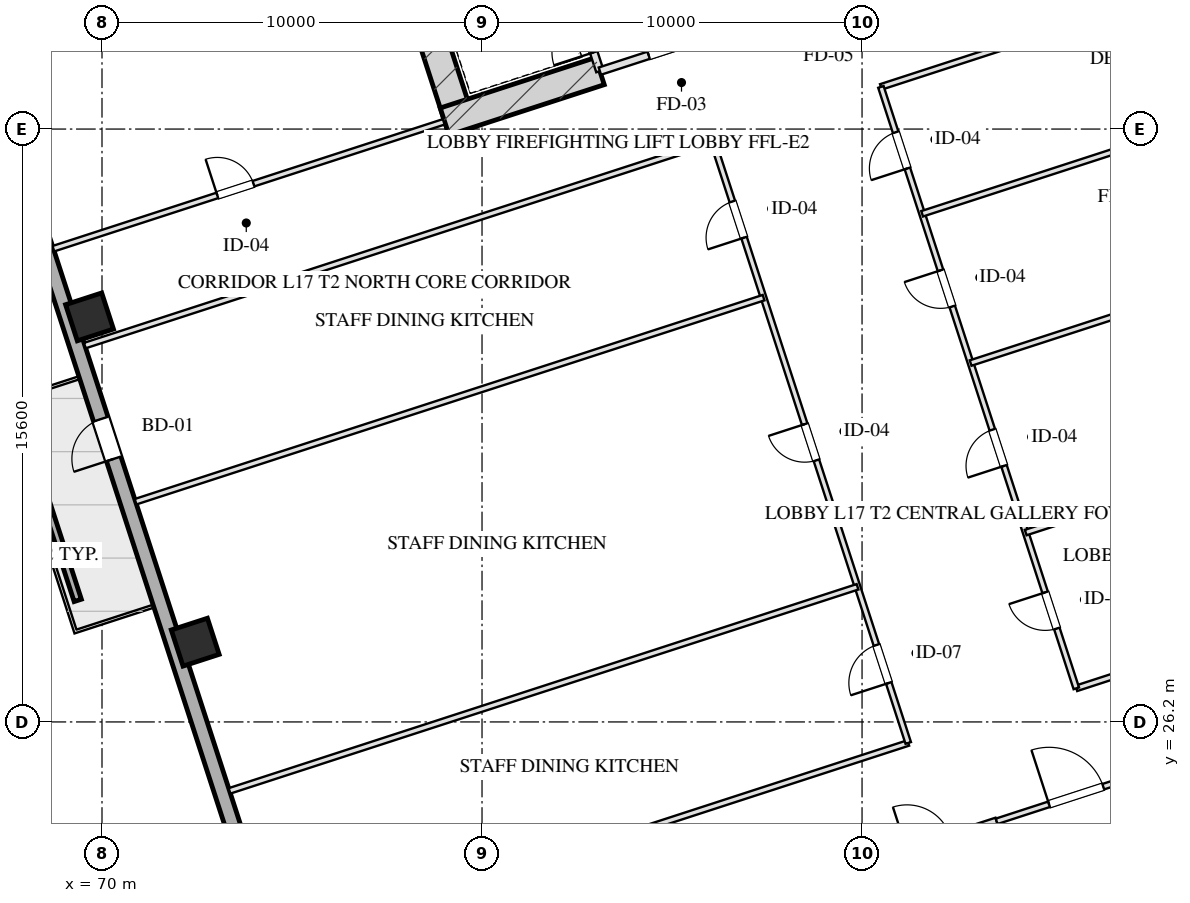
"""IFC4 building model, lengths in metres.
Left out: names, types, materials, properties, quantities, classifications, styles, units other than length and angle.
Written with IfcOpenShell. Run it as: python <this file> out.ifc"""

import sys

from ifc_helpers import new_model, si_unit, direction, frame, frame_2d, origin, origin_2d, place, context, subcontext, project, spatial, rectangle, hollow_rectangle, extrude, element, fill, save


model = new_model("IFC4")
c1 = context("Model", 3, precision=1e-05, world=origin(), true_north=direction((0.0, 1.0)))
c2 = subcontext(c1, "Body", "Model", "MODEL_VIEW")
j1 = project(units=[si_unit("LENGTHUNIT", "METRE"), si_unit("PLANEANGLEUNIT", "RADIAN")], contexts=[c1])
p1 = place(None, origin())
s1 = spatial("IfcSite", under=j1, at=p1, CompositionType="ELEMENT")
p2 = place(p1, origin())
s2 = spatial("IfcBuilding", under=s1, at=p2, CompositionType="ELEMENT")
p3 = place(p2, frame((0.0, 0.0, 71.3)))
s3 = spatial("IfcBuildingStorey", under=s2, at=p3, CompositionType="ELEMENT", Elevation=71.3)
p4 = place(p3, frame((79.489, 41.756, 0.0), z_axis=(0.0, 0.0, 1.0), x_axis=(-0.309016134813, 0.951056795583, 0.0)))
e1 = element("IfcWall", 1, at=p4, inside=s3, PredefinedType="SHEAR", context=c2, shape_type="SweptSolid", body=[
    extrude(rectangle(XDim=9.63, YDim=0.75, at=frame_2d((4.815, 0.0))), origin(), (0.0, 0.0, 1.0), 3.45),
])
p5 = place(p3, frame((79.016, 41.997, 0.0), z_axis=(0.0, 0.0, 1.0), x_axis=(0.95106038264, 0.309005094736, 0.0)))
e2 = element("IfcWall", 2, at=p5, inside=s3, PredefinedType="SHEAR", context=c2, shape_type="SweptSolid", body=[
    extrude(rectangle(XDim=4.295, YDim=0.75, at=frame_2d((2.147, 0.0))), origin(), (0.0, 0.0, 1.0), 3.45),
])
for number, where, z_axis, x_axis in (
    (3, (72.453, 28.299, 0.0), (0.0, 0.0, 1.0), (0.951, 0.309, 0.0)),
    (4, (69.672, 36.858, 0.0), (0.0, 0.0, 1.0), (0.951, 0.309, 0.0)),
):
    element("IfcColumn", number, at=place(p3, frame(where, z_axis=z_axis, x_axis=x_axis)), inside=s3, PredefinedType="COLUMN", context=c2, shape_type="SweptSolid", body=[
        extrude(hollow_rectangle(XDim=1.0, YDim=1.0, WallThickness=0.036, at=origin_2d()), origin(), (0.0, 0.0, 1.0), 3.451),
    ])
p6 = place(p3, frame((79.655, 4.352, 0.0), z_axis=(0.0, 0.0, 1.0), x_axis=(-0.309014526607, 0.951057318118, 0.0)))
e5 = element("IfcWall", 5, at=p6, inside=s3, PredefinedType="SOLIDWALL", context=c2, shape_type="SweptSolid", body=[
    extrude(rectangle(XDim=50.0, YDim=0.4, at=frame_2d((25.0, 0.0))), origin(), (0.0, 0.0, 1.0), 2.61),
])
p7 = place(p6, frame((17.35, 0.0, 0.75)))
e6 = element("IfcOpeningElement", 6, at=p7, cuts=e5, PredefinedType="OPENING", context=c2, shape_type="SweptSolid", body=[
    extrude(rectangle(XDim=2.5, YDim=1.46, at=frame_2d((1.25, 0.73))), frame((0.0, 0.21, 0.0), z_axis=(0.0, -1.0, 0.0), x_axis=(1.0, 0.0, 0.0)), (0.0, 0.0, 1.0), 0.42),
])
p8 = place(p6, frame((30.25, 0.0, 0.0)))
e7 = element("IfcOpeningElement", 7, at=p8, cuts=e5, PredefinedType="OPENING", context=c2, shape_type="SweptSolid", body=[
    extrude(rectangle(XDim=1.1, YDim=2.15, at=frame_2d((0.55, 1.075))), frame((0.0, 0.21, 0.0), z_axis=(0.0, -1.0, 0.0), x_axis=(1.0, 0.0, 0.0)), (0.0, 0.0, 1.0), 0.42),
])
p9 = place(p3, frame((69.362, 29.397, 0.0), z_axis=(0.0, 0.0, 1.0), x_axis=(-0.309032019345, 0.951051634255, 0.0)))
e8 = element("IfcWall", 8, at=p9, inside=s3, PredefinedType="PARAPET", context=c2, shape_type="SweptSolid", body=[
    extrude(rectangle(XDim=4.8, YDim=0.2, at=frame_2d((2.4, 0.0))), origin(), (0.0, 0.0, 1.0), 0.75),
])
p10 = place(p3, frame((93.542, 23.585, 0.0), z_axis=(0.0, 0.0, 1.0), x_axis=(0.309042196757, -0.951048327176, 0.0)))
e9 = element("IfcWall", 9, at=p10, inside=s3, PredefinedType="PARTITIONING", context=c2, shape_type="SweptSolid", body=[
    extrude(rectangle(XDim=8.43, YDim=0.2, at=frame_2d((4.215, 0.0))), origin(), (0.0, 0.0, 1.0), 3.175),
])
p11 = place(p3, frame((89.899, 22.401, 0.0), z_axis=(0.0, 0.0, 1.0), x_axis=(0.951046716504, 0.309047153403, 0.0)))
e10 = element("IfcWall", 10, at=p11, inside=s3, PredefinedType="PARTITIONING", context=c2, shape_type="SweptSolid", body=[
    extrude(rectangle(XDim=3.83, YDim=0.2, at=frame_2d((1.915, 0.0))), origin(), (0.0, 0.0, 1.0), 3.175),
])
p12 = place(p11, frame((1.35, 0.0, 0.0)))
e11 = element("IfcOpeningElement", 11, at=p12, cuts=e10, PredefinedType="OPENING", context=c2, shape_type="SweptSolid", body=[
    extrude(rectangle(XDim=1.2, YDim=2.05, at=frame_2d((0.6, 1.025))), frame((0.0, 0.11, 0.0), z_axis=(0.0, -1.0, 0.0), x_axis=(1.0, 0.0, 0.0)), (0.0, 0.0, 1.0), 0.22),
])
p13 = place(p3, frame((93.542, 23.585, 0.0), z_axis=(0.0, 0.0, 1.0), x_axis=(0.951063829732, 0.308994485023, 0.0)))
e12 = element("IfcWall", 12, at=p13, inside=s3, PredefinedType="PARTITIONING", context=c2, shape_type="SweptSolid", body=[
    extrude(rectangle(XDim=4.4, YDim=0.15, at=frame_2d((2.2, 0.0))), origin(), (0.0, 0.0, 1.0), 3.175),
])
p14 = place(p13, frame((1.45, 0.0, 0.0)))
e13 = element("IfcOpeningElement", 13, at=p14, cuts=e12, PredefinedType="OPENING", context=c2, shape_type="SweptSolid", body=[
    extrude(rectangle(XDim=1.5, YDim=2.05, at=frame_2d((0.75, 1.025))), frame((0.0, 0.085, 0.0), z_axis=(0.0, -1.0, 0.0), x_axis=(1.0, 0.0, 0.0)), (0.0, 0.0, 1.0), 0.17),
])
p15 = place(p3, frame((83.101, 43.324, 0.0), z_axis=(0.0, 0.0, 1.0), x_axis=(-0.309048298632, 0.951046344356, 0.0)))
e14 = element("IfcWall", 14, at=p15, inside=s3, PredefinedType="PARTITIONING", context=c2, shape_type="SweptSolid", body=[
    extrude(rectangle(XDim=1.9, YDim=0.2, at=frame_2d((0.95, 0.0))), origin(), (0.0, 0.0, 1.0), 3.175),
])
p16 = place(p15, frame((0.52, 0.0, 0.0)))
e15 = element("IfcOpeningElement", 15, at=p16, cuts=e14, PredefinedType="OPENING", context=c2, shape_type="SweptSolid", body=[
    extrude(rectangle(XDim=1.1, YDim=2.05, at=frame_2d((0.55, 1.025))), frame((0.0, 0.11, 0.0), z_axis=(0.0, -1.0, 0.0), x_axis=(1.0, 0.0, 0.0)), (0.0, 0.0, 1.0), 0.22),
])
p17 = place(p3, frame((83.101, 43.324, 0.0), z_axis=(0.0, 0.0, 1.0), x_axis=(0.951052804469, 0.309028417967, 0.0)))
e16 = element("IfcWall", 16, at=p17, inside=s3, PredefinedType="PARTITIONING", context=c2, shape_type="SweptSolid", body=[
    extrude(rectangle(XDim=3.83, YDim=0.2, at=frame_2d((1.915, 0.0))), origin(), (0.0, 0.0, 1.0), 3.175),
])
p18 = place(p17, frame((1.35, 0.0, 0.0)))
e17 = element("IfcOpeningElement", 17, at=p18, cuts=e16, PredefinedType="OPENING", context=c2, shape_type="SweptSolid", body=[
    extrude(rectangle(XDim=1.2, YDim=2.05, at=frame_2d((0.6, 1.025))), frame((0.0, 0.11, 0.0), z_axis=(0.0, -1.0, 0.0), x_axis=(1.0, 0.0, 0.0)), (0.0, 0.0, 1.0), 0.22),
])
p19 = place(p3, frame((68.721, 38.652, 0.0), z_axis=(0.0, 0.0, 1.0), x_axis=(0.951056658866, 0.309016555588, 0.0)))
e18 = element("IfcWall", 18, at=p19, inside=s3, PredefinedType="PARTITIONING", context=c2, shape_type="SweptSolid", body=[
    extrude(rectangle(XDim=10.8, YDim=0.15, at=frame_2d((5.4, 0.0))), origin(), (0.0, 0.0, 1.0), 3.175),
])
p20 = place(p19, frame((4.536, 0.0, 0.0)))
e19 = element("IfcOpeningElement", 19, at=p20, cuts=e18, PredefinedType="OPENING", context=c2, shape_type="SweptSolid", body=[
    extrude(rectangle(XDim=1.0, YDim=2.05, at=frame_2d((0.5, 1.025))), frame((0.0, 0.085, 0.0), z_axis=(0.0, -1.0, 0.0), x_axis=(1.0, 0.0, 0.0)), (0.0, 0.0, 1.0), 0.17),
])
p21 = place(p3, frame((74.691, 20.278, 0.0), z_axis=(0.0, 0.0, 1.0), x_axis=(0.951053169828, 0.309027293551, 0.0)))
e20 = element("IfcWall", 20, at=p21, inside=s3, PredefinedType="PARTITIONING", context=c2, shape_type="SweptSolid", body=[
    extrude(rectangle(XDim=17.375, YDim=0.15, at=frame_2d((8.688, 0.0))), origin(), (0.0, 0.0, 1.0), 3.175),
])
p22 = place(p3, frame((95.638, 27.084, 0.0), z_axis=(0.0, 0.0, 1.0), x_axis=(0.951055837847, 0.309019082414, 0.0)))
e21 = element("IfcWall", 21, at=p22, inside=s3, PredefinedType="PARTITIONING", context=c2, shape_type="SweptSolid", body=[
    extrude(rectangle(XDim=15.575, YDim=0.15, at=frame_2d((7.788, 0.0))), origin(), (0.0, 0.0, 1.0), 3.175),
])
p23 = place(p3, frame((69.549, 36.103, 0.0), z_axis=(0.0, 0.0, 1.0), x_axis=(0.951057299418, 0.309014584159, 0.0)))
e22 = element("IfcWall", 22, at=p23, inside=s3, PredefinedType="PARTITIONING", context=c2, shape_type="SweptSolid", body=[
    extrude(rectangle(XDim=17.375, YDim=0.15, at=frame_2d((8.688, 0.0))), origin(), (0.0, 0.0, 1.0), 3.175),
])
p24 = place(p3, frame((90.496, 42.909, 0.0), z_axis=(0.0, 0.0, 1.0), x_axis=(0.951055837847, 0.309019082414, 0.0)))
e23 = element("IfcWall", 23, at=p24, inside=s3, PredefinedType="PARTITIONING", context=c2, shape_type="SweptSolid", body=[
    extrude(rectangle(XDim=15.575, YDim=0.15, at=frame_2d((7.788, 0.0))), origin(), (0.0, 0.0, 1.0), 3.175),
])
p25 = place(p3, frame((91.216, 25.647, 0.0), z_axis=(0.0, 0.0, 1.0), x_axis=(-0.309022042254, 0.951054876125, 0.0)))
e24 = element("IfcWall", 24, at=p25, inside=s3, PredefinedType="PARTITIONING", context=c2, shape_type="SweptSolid", body=[
    extrude(rectangle(XDim=16.64, YDim=0.15, at=frame_2d((8.32, 0.0))), origin(), (0.0, 0.0, 1.0), 3.175),
])
p26 = place(p25, frame((1.66, 0.0, 0.0)))
e25 = element("IfcOpeningElement", 25, at=p26, cuts=e24, PredefinedType="OPENING", context=c2, shape_type="SweptSolid", body=[
    extrude(rectangle(XDim=1.05, YDim=2.05, at=frame_2d((0.525, 1.025))), frame((0.0, 0.085, 0.0), z_axis=(0.0, -1.0, 0.0), x_axis=(1.0, 0.0, 0.0)), (0.0, 0.0, 1.0), 0.17),
])
p27 = place(p25, frame((7.82, 0.0, 0.0)))
e26 = element("IfcOpeningElement", 26, at=p27, cuts=e24, PredefinedType="OPENING", context=c2, shape_type="SweptSolid", body=[
    extrude(rectangle(XDim=1.0, YDim=2.05, at=frame_2d((0.5, 1.025))), frame((0.0, 0.085, 0.0), z_axis=(0.0, -1.0, 0.0), x_axis=(1.0, 0.0, 0.0)), (0.0, 0.0, 1.0), 0.17),
])
p28 = place(p25, frame((13.98, 0.0, 0.0)))
e27 = element("IfcOpeningElement", 27, at=p28, cuts=e24, PredefinedType="OPENING", context=c2, shape_type="SweptSolid", body=[
    extrude(rectangle(XDim=1.0, YDim=2.05, at=frame_2d((0.5, 1.025))), frame((0.0, 0.085, 0.0), z_axis=(0.0, -1.0, 0.0), x_axis=(1.0, 0.0, 0.0)), (0.0, 0.0, 1.0), 0.17),
])
p29 = place(p3, frame((95.638, 27.084, 0.0), z_axis=(0.0, 0.0, 1.0), x_axis=(-0.30901773025, 0.951056277195, 0.0)))
e28 = element("IfcWall", 28, at=p29, inside=s3, PredefinedType="PARTITIONING", context=c2, shape_type="SweptSolid", body=[
    extrude(rectangle(XDim=16.64, YDim=0.15, at=frame_2d((8.32, 0.0))), origin(), (0.0, 0.0, 1.0), 3.175),
])
p30 = place(p29, frame((1.655, 0.0, 0.0)))
e29 = element("IfcOpeningElement", 29, at=p30, cuts=e28, PredefinedType="OPENING", context=c2, shape_type="SweptSolid", body=[
    extrude(rectangle(XDim=1.0, YDim=2.05, at=frame_2d((0.5, 1.025))), frame((0.0, 0.085, 0.0), z_axis=(0.0, -1.0, 0.0), x_axis=(1.0, 0.0, 0.0)), (0.0, 0.0, 1.0), 0.17),
])
p31 = place(p29, frame((6.155, 0.0, 0.0)))
e30 = element("IfcOpeningElement", 30, at=p31, cuts=e28, PredefinedType="OPENING", context=c2, shape_type="SweptSolid", body=[
    extrude(rectangle(XDim=1.0, YDim=2.05, at=frame_2d((0.5, 1.025))), frame((0.0, 0.085, 0.0), z_axis=(0.0, -1.0, 0.0), x_axis=(1.0, 0.0, 0.0)), (0.0, 0.0, 1.0), 0.17),
])
p32 = place(p29, frame((10.565, 0.0, 0.0)))
e31 = element("IfcOpeningElement", 31, at=p32, cuts=e28, PredefinedType="OPENING", context=c2, shape_type="SweptSolid", body=[
    extrude(rectangle(XDim=1.0, YDim=2.05, at=frame_2d((0.5, 1.025))), frame((0.0, 0.085, 0.0), z_axis=(0.0, -1.0, 0.0), x_axis=(1.0, 0.0, 0.0)), (0.0, 0.0, 1.0), 0.17),
])
p33 = place(p29, frame((14.385, 0.0, 0.0)))
e32 = element("IfcOpeningElement", 32, at=p33, cuts=e28, PredefinedType="OPENING", context=c2, shape_type="SweptSolid", body=[
    extrude(rectangle(XDim=1.0, YDim=2.05, at=frame_2d((0.5, 1.025))), frame((0.0, 0.085, 0.0), z_axis=(0.0, -1.0, 0.0), x_axis=(1.0, 0.0, 0.0)), (0.0, 0.0, 1.0), 0.17),
])
for number, where, z_axis, x_axis in (
    (33, (73.356, 24.386, 0.0), (0.0, 0.0, 1.0), (0.951, 0.309, 0.0)),
    (34, (70.884, 31.995, 0.0), (0.0, 0.0, 1.0), (0.951, 0.309, 0.0)),
):
    element("IfcWall", number, at=place(p3, frame(where, z_axis=z_axis, x_axis=x_axis)), inside=s3, PredefinedType="PARTITIONING", context=c2, shape_type="SweptSolid", body=[
        extrude(rectangle(XDim=17.375, YDim=0.15, at=frame_2d((8.688, 0.0))), origin(), (0.0, 0.0, 1.0), 3.175),
    ])
for number, where, z_axis, x_axis in (
    (35, (94.306, 31.183, 0.0), (0.0, 0.0, 1.0), (0.951, 0.309, 0.0)),
    (36, (92.857, 35.643, 0.0), (0.0, 0.0, 1.0), (0.951, 0.309, 0.0)),
    (37, (91.581, 39.57, 0.0), (0.0, 0.0, 1.0), (0.951, 0.309, 0.0)),
):
    element("IfcWall", number, at=place(p3, frame(where, z_axis=z_axis, x_axis=x_axis)), inside=s3, PredefinedType="PARTITIONING", context=c2, shape_type="SweptSolid", body=[
        extrude(rectangle(XDim=15.575, YDim=0.15, at=frame_2d((7.788, 0.0))), origin(), (0.0, 0.0, 1.0), 3.175),
    ])
p34 = place(p8, origin())
e38 = element("IfcDoor", 38, at=p34, inside=s3, OperationType="SINGLE_SWING_LEFT", PredefinedType="DOOR", context=c2, shape_type="SweptSolid", body=[
    extrude(rectangle(XDim=1.1, YDim=2.15, at=frame_2d((0.55, 1.075))), frame((0.0, 0.025, 0.0), z_axis=(0.0, -1.0, 0.0), x_axis=(1.0, 0.0, 0.0)), (0.0, 0.0, 1.0), 0.05),
])
fill(e7, e38)
p35 = place(p14, origin())
e39 = element("IfcDoor", 39, at=p35, inside=s3, OperationType="SINGLE_SWING_LEFT", PredefinedType="DOOR", context=c2, shape_type="SweptSolid", body=[
    extrude(rectangle(XDim=1.5, YDim=2.05, at=frame_2d((0.75, 1.025))), frame((0.0, 0.025, 0.0), z_axis=(0.0, -1.0, 0.0), x_axis=(1.0, 0.0, 0.0)), (0.0, 0.0, 1.0), 0.05),
])
fill(e13, e39)
p36 = place(p18, origin())
e40 = element("IfcDoor", 40, at=p36, inside=s3, OperationType="SINGLE_SWING_LEFT", PredefinedType="DOOR", context=c2, shape_type="SweptSolid", body=[
    extrude(rectangle(XDim=1.2, YDim=2.05, at=frame_2d((0.6, 1.025))), frame((0.0, 0.025, 0.0), z_axis=(0.0, -1.0, 0.0), x_axis=(1.0, 0.0, 0.0)), (0.0, 0.0, 1.0), 0.05),
])
fill(e17, e40)
p37 = place(p20, origin())
e41 = element("IfcDoor", 41, at=p37, inside=s3, OperationType="SINGLE_SWING_LEFT", PredefinedType="DOOR", context=c2, shape_type="SweptSolid", body=[
    extrude(rectangle(XDim=1.0, YDim=2.05, at=frame_2d((0.5, 1.025))), frame((0.0, 0.025, 0.0), z_axis=(0.0, -1.0, 0.0), x_axis=(1.0, 0.0, 0.0)), (0.0, 0.0, 1.0), 0.05),
])
fill(e19, e41)
p38 = place(p26, origin())
e42 = element("IfcDoor", 42, at=p38, inside=s3, OperationType="SINGLE_SWING_LEFT", PredefinedType="DOOR", context=c2, shape_type="SweptSolid", body=[
    extrude(rectangle(XDim=1.05, YDim=2.05, at=frame_2d((0.525, 1.025))), frame((0.0, 0.025, 0.0), z_axis=(0.0, -1.0, 0.0), x_axis=(1.0, 0.0, 0.0)), (0.0, 0.0, 1.0), 0.05),
])
fill(e25, e42)
p39 = place(p27, origin())
e43 = element("IfcDoor", 43, at=p39, inside=s3, OperationType="SINGLE_SWING_RIGHT", PredefinedType="DOOR", context=c2, shape_type="SweptSolid", body=[
    extrude(rectangle(XDim=1.0, YDim=2.05, at=frame_2d((0.5, 1.025))), frame((0.0, 0.025, 0.0), z_axis=(0.0, -1.0, 0.0), x_axis=(1.0, 0.0, 0.0)), (0.0, 0.0, 1.0), 0.05),
])
fill(e26, e43)
p40 = place(p28, origin())
e44 = element("IfcDoor", 44, at=p40, inside=s3, OperationType="SINGLE_SWING_LEFT", PredefinedType="DOOR", context=c2, shape_type="SweptSolid", body=[
    extrude(rectangle(XDim=1.0, YDim=2.05, at=frame_2d((0.5, 1.025))), frame((0.0, 0.025, 0.0), z_axis=(0.0, -1.0, 0.0), x_axis=(1.0, 0.0, 0.0)), (0.0, 0.0, 1.0), 0.05),
])
fill(e27, e44)
p41 = place(p30, origin())
e45 = element("IfcDoor", 45, at=p41, inside=s3, OperationType="SINGLE_SWING_RIGHT", PredefinedType="DOOR", context=c2, shape_type="SweptSolid", body=[
    extrude(rectangle(XDim=1.0, YDim=2.05, at=frame_2d((0.5, 1.025))), frame((0.0, 0.025, 0.0), z_axis=(0.0, -1.0, 0.0), x_axis=(1.0, 0.0, 0.0)), (0.0, 0.0, 1.0), 0.05),
])
fill(e29, e45)
p42 = place(p31, origin())
e46 = element("IfcDoor", 46, at=p42, inside=s3, OperationType="SINGLE_SWING_LEFT", PredefinedType="DOOR", context=c2, shape_type="SweptSolid", body=[
    extrude(rectangle(XDim=1.0, YDim=2.05, at=frame_2d((0.5, 1.025))), frame((0.0, 0.025, 0.0), z_axis=(0.0, -1.0, 0.0), x_axis=(1.0, 0.0, 0.0)), (0.0, 0.0, 1.0), 0.05),
])
fill(e30, e46)
p43 = place(p32, origin())
e47 = element("IfcDoor", 47, at=p43, inside=s3, OperationType="SINGLE_SWING_RIGHT", PredefinedType="DOOR", context=c2, shape_type="SweptSolid", body=[
    extrude(rectangle(XDim=1.0, YDim=2.05, at=frame_2d((0.5, 1.025))), frame((0.0, 0.025, 0.0), z_axis=(0.0, -1.0, 0.0), x_axis=(1.0, 0.0, 0.0)), (0.0, 0.0, 1.0), 0.05),
])
fill(e31, e47)
p44 = place(p33, origin())
e48 = element("IfcDoor", 48, at=p44, inside=s3, OperationType="SINGLE_SWING_LEFT", PredefinedType="DOOR", context=c2, shape_type="SweptSolid", body=[
    extrude(rectangle(XDim=1.0, YDim=2.05, at=frame_2d((0.5, 1.025))), frame((0.0, 0.025, 0.0), z_axis=(0.0, -1.0, 0.0), x_axis=(1.0, 0.0, 0.0)), (0.0, 0.0, 1.0), 0.05),
])
fill(e32, e48)
save(model, sys.argv[1])
